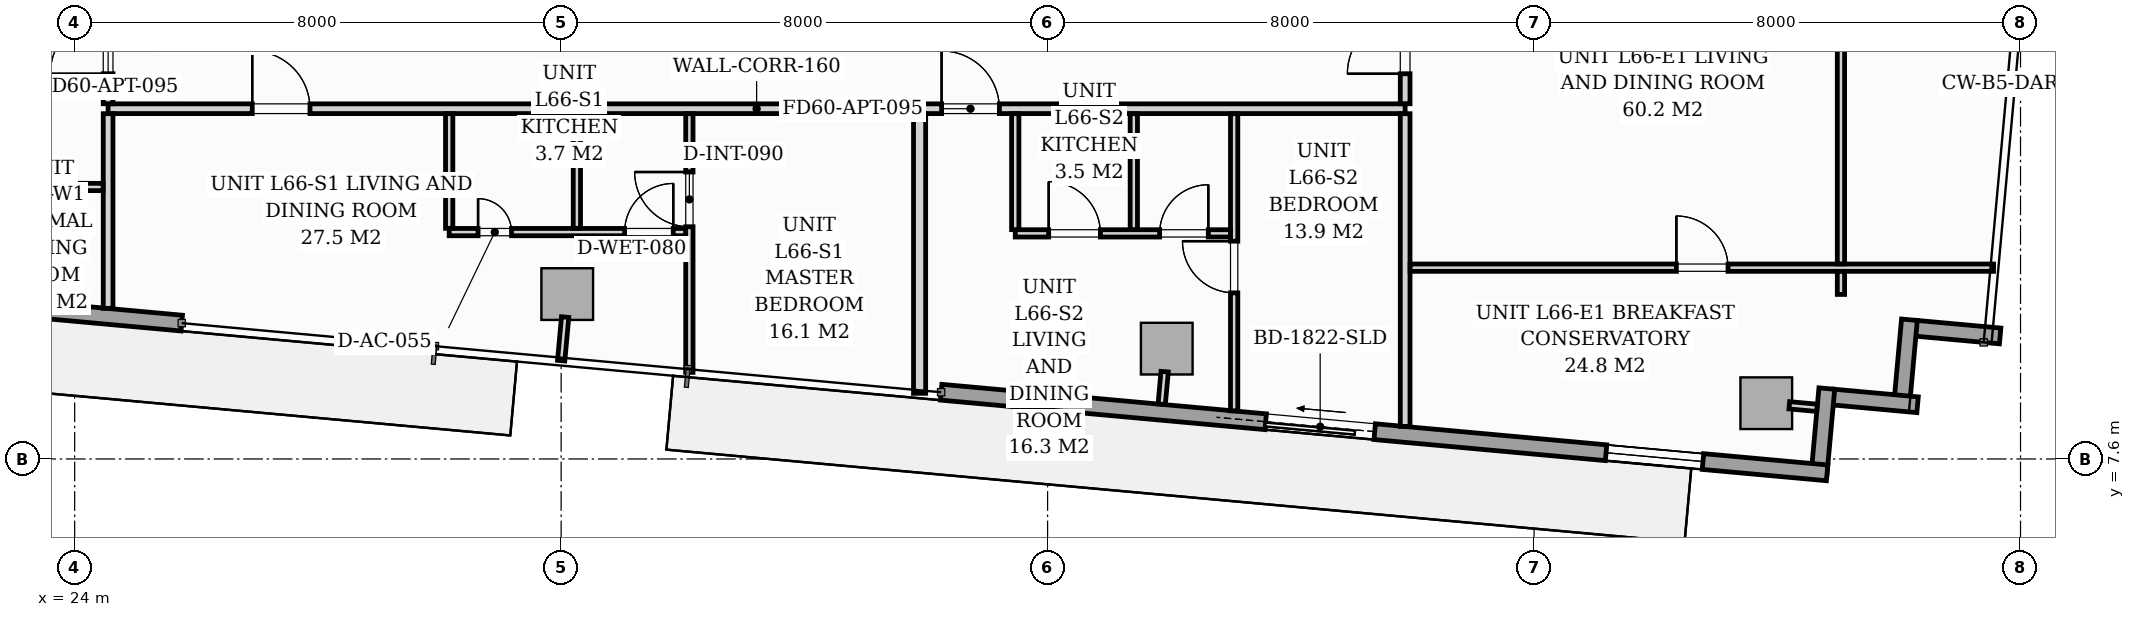
"""IFC4 building model, lengths in metres.
Left out: names, types, materials, properties, quantities, classifications, styles, units other than length and angle.
Written with IfcOpenShell. Run it as: python <this file> out.ifc"""

import sys

from ifc_helpers import new_model, si_unit, direction, frame, frame_2d, origin, origin_2d, place, context, subcontext, project, spatial, rectangle, extrude, source, transform, mapped, element, fill, save


model = new_model("IFC4")
c1 = context("Model", 3, precision=1e-05, world=origin(), true_north=direction((0.0, 1.0)))
c2 = subcontext(c1, "Body", "Model", "MODEL_VIEW")
j1 = project(units=[si_unit("LENGTHUNIT", "METRE"), si_unit("PLANEANGLEUNIT", "RADIAN")], contexts=[c1])
p1 = place(None, origin())
s1 = spatial("IfcSite", under=j1, at=p1, CompositionType="ELEMENT")
p2 = place(p1, origin())
s2 = spatial("IfcBuilding", under=s1, at=p2, CompositionType="ELEMENT")
p3 = place(p2, frame((0.0, 0.0, 229.8)))
s3 = spatial("IfcBuildingStorey", under=s2, at=p3, CompositionType="ELEMENT", Elevation=229.8)
m1 = source(origin(), c2, "Body", "SweptSolid", [
    extrude(rectangle(XDim=0.85, YDim=0.85, at=origin_2d()), origin(), (0.0, 0.0, 1.0), 3.296),
])
for number, where, z_axis, x_axis in (
    (1, (32.1, 10.312, 0.002), (0.0, 0.0, 1.0), (0.996, -0.091, 0.0)),
    (2, (41.96, 9.415, 0.002), (0.0, 0.0, 1.0), (0.996, -0.091, 0.0)),
    (3, (51.819, 8.517, 0.002), (0.0, 0.0, 1.0), (0.996, -0.091, 0.0)),
):
    element("IfcColumn", number, at=place(p3, frame(where, z_axis=z_axis, x_axis=x_axis)), inside=s3, PredefinedType="COLUMN", context=c2, shape_type="MappedRepresentation", body=[
        mapped(m1, transform((0.0, 0.0, 0.0), scale=1.0)),
    ])
for number, where, z_axis, x_axis in (
    (4, (55.665, 9.623, 0.0), (0.0, 0.0, 1.0), (-0.996, 0.091, 0.0)),
    (5, (54.173, 9.889, 0.0), (0.0, 0.0, 1.0), (-0.091, -0.996, 0.0)),
):
    element("IfcWall", number, at=place(p3, frame(where, z_axis=z_axis, x_axis=x_axis)), inside=s3, PredefinedType="STANDARD", context=c2, shape_type="SweptSolid", body=[
        extrude(rectangle(XDim=1.395, YDim=0.26, at=frame_2d((0.698, 0.0))), origin(), (0.0, 0.0, 1.0), 3.04),
    ])
for number, where, z_axis, x_axis in (
    (6, (54.307, 8.492, 0.0), (0.0, 0.0, 1.0), (-0.996, 0.091, 0.0)),
    (7, (52.815, 8.758, 0.0), (0.0, 0.0, 1.0), (-0.091, -0.996, 0.0)),
):
    element("IfcWall", number, at=place(p3, frame(where, z_axis=z_axis, x_axis=x_axis)), inside=s3, PredefinedType="STANDARD", context=c2, shape_type="SweptSolid", body=[
        extrude(rectangle(XDim=1.395, YDim=0.26, at=frame_2d((0.698, 0.0))), origin(), (0.0, 0.0, 1.0), 3.04),
    ])
p4 = place(p3, frame((52.819, 7.372, 0.0), z_axis=(0.0, 0.0, 1.0), x_axis=(-0.995884447498, 0.090632043071, 0.0)))
e8 = element("IfcWall", 8, at=p4, inside=s3, PredefinedType="STANDARD", context=c2, shape_type="SweptSolid", body=[
    extrude(rectangle(XDim=14.63, YDim=0.26, at=frame_2d((7.315, 0.0))), origin(), (0.0, 0.0, 1.0), 3.04),
])
p5 = place(p4, frame((7.471, 0.0, 0.0)))
e9 = element("IfcOpeningElement", 9, at=p5, cuts=e8, PredefinedType="OPENING", context=c2, shape_type="SweptSolid", body=[
    extrude(rectangle(XDim=1.8, YDim=2.06, at=frame_2d((0.9, 1.03))), frame((0.0, 0.14, 0.0), z_axis=(0.0, -1.0, 0.0), x_axis=(1.0, 0.0, 0.0)), (0.0, 0.0, 1.0), 0.28),
])
p6 = place(p4, frame((2.05, 0.0, 0.65)))
e10 = element("IfcOpeningElement", 10, at=p6, cuts=e8, PredefinedType="OPENING", context=c2, shape_type="SweptSolid", body=[
    extrude(rectangle(XDim=1.6, YDim=1.5, at=frame_2d((0.8, 0.75))), frame((0.0, 0.14, 0.0), z_axis=(0.0, -1.0, 0.0), x_axis=(1.0, 0.0, 0.0)), (0.0, 0.0, 1.0), 0.28),
])
p7 = place(p3, frame((25.761, 9.834, 0.0), z_axis=(0.0, 0.0, 1.0), x_axis=(-0.995884584572, 0.090630536861, 0.0)))
e11 = element("IfcWall", 11, at=p7, inside=s3, PredefinedType="STANDARD", context=c2, shape_type="SweptSolid", body=[
    extrude(rectangle(XDim=14.63, YDim=0.26, at=frame_2d((7.315, 0.0))), origin(), (0.0, 0.0, 1.0), 3.04),
])
p8 = place(p7, frame((5.53, 0.0, 0.0)))
e12 = element("IfcOpeningElement", 12, at=p8, cuts=e11, PredefinedType="OPENING", context=c2, shape_type="SweptSolid", body=[
    extrude(rectangle(XDim=1.8, YDim=2.06, at=frame_2d((0.9, 1.03))), frame((0.0, 0.14, 0.0), z_axis=(0.0, -1.0, 0.0), x_axis=(1.0, 0.0, 0.0)), (0.0, 0.0, 1.0), 0.28),
])
p9 = place(p7, frame((7.9, 0.0, 0.65)))
e13 = element("IfcOpeningElement", 13, at=p9, cuts=e11, PredefinedType="OPENING", context=c2, shape_type="SweptSolid", body=[
    extrude(rectangle(XDim=1.6, YDim=1.5, at=frame_2d((0.8, 0.75))), frame((0.0, 0.14, 0.0), z_axis=(0.0, -1.0, 0.0), x_axis=(1.0, 0.0, 0.0)), (0.0, 0.0, 1.0), 0.28),
])
p10 = place(p3, frame((24.55, 13.36, 0.0), z_axis=(0.0, 0.0, 1.0), x_axis=(1.0, 0.0, 0.0)))
e14 = element("IfcWall", 14, at=p10, inside=s3, PredefinedType="PARTITIONING", context=c2, shape_type="SweptSolid", body=[
    extrude(rectangle(XDim=21.33, YDim=0.16, at=frame_2d((10.665, 0.0))), origin(), (0.0, 0.0, 1.0), 2.55),
])
p11 = place(p10, frame((2.37, 0.0, 0.0)))
e15 = element("IfcOpeningElement", 15, at=p11, cuts=e14, PredefinedType="OPENING", context=c2, shape_type="SweptSolid", body=[
    extrude(rectangle(XDim=0.95, YDim=2.06, at=frame_2d((0.475, 1.03))), frame((0.0, 0.09, 0.0), z_axis=(0.0, -1.0, 0.0), x_axis=(1.0, 0.0, 0.0)), (0.0, 0.0, 1.0), 0.18),
])
p12 = place(p10, frame((13.707, 0.0, 0.0)))
e16 = element("IfcOpeningElement", 16, at=p12, cuts=e14, PredefinedType="OPENING", context=c2, shape_type="SweptSolid", body=[
    extrude(rectangle(XDim=0.95, YDim=2.06, at=frame_2d((0.475, 1.03))), frame((0.0, 0.09, 0.0), z_axis=(0.0, -1.0, 0.0), x_axis=(1.0, 0.0, 0.0)), (0.0, 0.0, 1.0), 0.18),
])
p13 = place(p3, frame((24.55, 10.077, 0.0), z_axis=(0.0, 0.0, 1.0), x_axis=(0.0, 1.0, 0.0)))
e17 = element("IfcWall", 17, at=p13, inside=s3, PredefinedType="PARTITIONING", context=c2, shape_type="SweptSolid", body=[
    extrude(rectangle(XDim=3.201, YDim=0.16, at=frame_2d((1.601, 0.0))), origin(), (0.0, 0.0, 1.0), 3.04),
])
p14 = place(p3, frame((24.55, 13.442, 0.0), z_axis=(0.0, 0.0, 1.0), x_axis=(0.0, 1.0, 0.0)))
e18 = element("IfcWall", 18, at=p14, inside=s3, PredefinedType="PARTITIONING", context=c2, shape_type="SweptSolid", body=[
    extrude(rectangle(XDim=7.208, YDim=0.16, at=frame_2d((3.604, 0.0))), origin(), (0.0, 0.0, 1.0), 3.04),
])
p15 = place(p14, frame((0.493, 0.0, 0.0)))
e19 = element("IfcOpeningElement", 19, at=p15, cuts=e18, PredefinedType="OPENING", context=c2, shape_type="SweptSolid", body=[
    extrude(rectangle(XDim=0.95, YDim=2.06, at=frame_2d((0.475, 1.03))), frame((0.0, 0.09, 0.0), z_axis=(0.0, -1.0, 0.0), x_axis=(1.0, 0.0, 0.0)), (0.0, 0.0, 1.0), 0.18),
])
p16 = place(p14, frame((4.721, 0.0, 0.0)))
e20 = element("IfcOpeningElement", 20, at=p16, cuts=e18, PredefinedType="OPENING", context=c2, shape_type="SweptSolid", body=[
    extrude(rectangle(XDim=0.95, YDim=2.06, at=frame_2d((0.475, 1.03))), frame((0.0, 0.09, 0.0), z_axis=(0.0, -1.0, 0.0), x_axis=(1.0, 0.0, 0.0)), (0.0, 0.0, 1.0), 0.18),
])
p17 = place(p3, frame((45.88, 8.136, 0.0), z_axis=(0.0, 0.0, 1.0), x_axis=(0.0, 1.0, 0.0)))
e21 = element("IfcWall", 21, at=p17, inside=s3, PredefinedType="PARTITIONING", context=c2, shape_type="SweptSolid", body=[
    extrude(rectangle(XDim=5.142, YDim=0.16, at=frame_2d((2.571, 0.0))), origin(), (0.0, 0.0, 1.0), 3.04),
])
p18 = place(p3, frame((45.88, 13.442, 0.0), z_axis=(0.0, 0.0, 1.0), x_axis=(0.0, 1.0, 0.0)))
e22 = element("IfcWall", 22, at=p18, inside=s3, PredefinedType="PARTITIONING", context=c2, shape_type="SweptSolid", body=[
    extrude(rectangle(XDim=4.36, YDim=0.16, at=frame_2d((2.18, 0.0))), origin(), (0.0, 0.0, 1.0), 3.04),
])
p19 = place(p18, frame((0.493, 0.0, 0.0)))
e23 = element("IfcOpeningElement", 23, at=p19, cuts=e22, PredefinedType="OPENING", context=c2, shape_type="SweptSolid", body=[
    extrude(rectangle(XDim=0.95, YDim=2.06, at=frame_2d((0.475, 1.03))), frame((0.0, 0.09, 0.0), z_axis=(0.0, -1.0, 0.0), x_axis=(1.0, 0.0, 0.0)), (0.0, 0.0, 1.0), 0.18),
])
p20 = place(p3, frame((34.109, 9.024, 0.0), z_axis=(0.0, 0.0, 1.0), x_axis=(0.0, 1.0, 0.0)))
e24 = element("IfcWall", 24, at=p20, inside=s3, PredefinedType="PARTITIONING", context=c2, shape_type="SweptSolid", body=[
    extrude(rectangle(XDim=4.254, YDim=0.12, at=frame_2d((2.127, 0.0))), origin(), (0.0, 0.0, 1.0), 3.04),
])
p21 = place(p20, frame((2.395, 0.0, 0.0)))
e25 = element("IfcOpeningElement", 25, at=p21, cuts=e24, PredefinedType="OPENING", context=c2, shape_type="SweptSolid", body=[
    extrude(rectangle(XDim=0.9, YDim=2.05, at=frame_2d((0.45, 1.025))), frame((0.0, 0.07, 0.0), z_axis=(0.0, -1.0, 0.0), x_axis=(1.0, 0.0, 0.0)), (0.0, 0.0, 1.0), 0.14),
])
p22 = place(p3, frame((30.159, 11.331, 0.0), z_axis=(0.0, 0.0, 1.0), x_axis=(1.0, 0.0, 0.0)))
e26 = element("IfcWall", 26, at=p22, inside=s3, PredefinedType="PARTITIONING", context=c2, shape_type="SweptSolid", body=[
    extrude(rectangle(XDim=3.888, YDim=0.12, at=frame_2d((1.944, 0.0))), origin(), (0.0, 0.0, 1.0), 2.55),
])
p23 = place(p22, frame((0.475, 0.0, 0.0)))
e27 = element("IfcOpeningElement", 27, at=p23, cuts=e26, PredefinedType="OPENING", context=c2, shape_type="SweptSolid", body=[
    extrude(rectangle(XDim=0.55, YDim=2.0, at=frame_2d((0.275, 1.0))), frame((0.0, 0.07, 0.0), z_axis=(0.0, -1.0, 0.0), x_axis=(1.0, 0.0, 0.0)), (0.0, 0.0, 1.0), 0.14),
])
p24 = place(p22, frame((2.885, 0.0, 0.0)))
e28 = element("IfcOpeningElement", 28, at=p24, cuts=e26, PredefinedType="OPENING", context=c2, shape_type="SweptSolid", body=[
    extrude(rectangle(XDim=0.8, YDim=2.02, at=frame_2d((0.4, 1.01))), frame((0.0, 0.07, 0.0), z_axis=(0.0, -1.0, 0.0), x_axis=(1.0, 0.0, 0.0)), (0.0, 0.0, 1.0), 0.14),
])
p25 = place(p3, frame((32.259, 11.393, 0.0), z_axis=(0.0, 0.0, 1.0), x_axis=(0.0, 1.0, 0.0)))
e29 = element("IfcWall", 29, at=p25, inside=s3, PredefinedType="PARTITIONING", context=c2, shape_type="SweptSolid", body=[
    extrude(rectangle(XDim=1.885, YDim=0.12, at=frame_2d((0.942, 0.0))), origin(), (0.0, 0.0, 1.0), 2.4),
])
p26 = place(p3, frame((30.159, 11.393, 0.0), z_axis=(0.0, 0.0, 1.0), x_axis=(0.0, 1.0, 0.0)))
e30 = element("IfcWall", 30, at=p26, inside=s3, PredefinedType="PARTITIONING", context=c2, shape_type="SweptSolid", body=[
    extrude(rectangle(XDim=1.885, YDim=0.12, at=frame_2d((0.942, 0.0))), origin(), (0.0, 0.0, 1.0), 3.04),
])
p27 = place(p3, frame((37.895, 8.68, 0.0), z_axis=(0.0, 0.0, 1.0), x_axis=(0.0, 1.0, 0.0)))
e31 = element("IfcWall", 31, at=p27, inside=s3, PredefinedType="PARTITIONING", context=c2, shape_type="SweptSolid", body=[
    extrude(rectangle(XDim=4.598, YDim=0.2, at=frame_2d((2.299, 0.0))), origin(), (0.0, 0.0, 1.0), 3.04),
])
p28 = place(p3, frame((43.068, 8.392, 0.0), z_axis=(0.0, 0.0, 1.0), x_axis=(0.0, 1.0, 0.0)))
e32 = element("IfcWall", 32, at=p28, inside=s3, PredefinedType="PARTITIONING", context=c2, shape_type="SweptSolid", body=[
    extrude(rectangle(XDim=4.886, YDim=0.12, at=frame_2d((2.443, 0.0))), origin(), (0.0, 0.0, 1.0), 3.04),
])
p29 = place(p28, frame((1.94, 0.0, 0.0)))
e33 = element("IfcOpeningElement", 33, at=p29, cuts=e32, PredefinedType="OPENING", context=c2, shape_type="SweptSolid", body=[
    extrude(rectangle(XDim=0.85, YDim=2.05, at=frame_2d((0.425, 1.025))), frame((0.0, 0.07, 0.0), z_axis=(0.0, -1.0, 0.0), x_axis=(1.0, 0.0, 0.0)), (0.0, 0.0, 1.0), 0.14),
])
p30 = place(p3, frame((39.468, 11.31, 0.0), z_axis=(0.0, 0.0, 1.0), x_axis=(1.0, 0.0, 0.0)))
e34 = element("IfcWall", 34, at=p30, inside=s3, PredefinedType="PARTITIONING", context=c2, shape_type="SweptSolid", body=[
    extrude(rectangle(XDim=3.538, YDim=0.12, at=frame_2d((1.769, 0.0))), origin(), (0.0, 0.0, 1.0), 3.04),
])
p31 = place(p30, frame((0.55, 0.0, 0.0)))
e35 = element("IfcOpeningElement", 35, at=p31, cuts=e34, PredefinedType="OPENING", context=c2, shape_type="SweptSolid", body=[
    extrude(rectangle(XDim=0.85, YDim=2.05, at=frame_2d((0.425, 1.025))), frame((0.0, 0.07, 0.0), z_axis=(0.0, -1.0, 0.0), x_axis=(1.0, 0.0, 0.0)), (0.0, 0.0, 1.0), 0.14),
])
p32 = place(p30, frame((2.375, 0.0, 0.0)))
e36 = element("IfcOpeningElement", 36, at=p32, cuts=e34, PredefinedType="OPENING", context=c2, shape_type="SweptSolid", body=[
    extrude(rectangle(XDim=0.8, YDim=2.02, at=frame_2d((0.4, 1.01))), frame((0.0, 0.07, 0.0), z_axis=(0.0, -1.0, 0.0), x_axis=(1.0, 0.0, 0.0)), (0.0, 0.0, 1.0), 0.14),
])
for number, where, z_axis, x_axis in (
    (37, (39.468, 11.372, 0.0), (0.0, 0.0, 1.0), (0.0, 1.0, 0.0)),
    (38, (41.418, 11.372, 0.0), (0.0, 0.0, 1.0), (0.0, 1.0, 0.0)),
):
    element("IfcWall", number, at=place(p3, frame(where, z_axis=z_axis, x_axis=x_axis)), inside=s3, PredefinedType="PARTITIONING", context=c2, shape_type="SweptSolid", body=[
        extrude(rectangle(XDim=1.906, YDim=0.12, at=frame_2d((0.953, 0.0))), origin(), (0.0, 0.0, 1.0), 3.04),
    ])
p33 = place(p3, frame((13.643, 12.073, 0.0), z_axis=(0.0, 0.0, 1.0), x_axis=(1.0, 0.0, 0.0)))
e39 = element("IfcWall", 39, at=p33, inside=s3, PredefinedType="PARTITIONING", context=c2, shape_type="SweptSolid", body=[
    extrude(rectangle(XDim=10.825, YDim=0.12, at=frame_2d((5.413, 0.0))), origin(), (0.0, 0.0, 1.0), 2.482),
])
p34 = place(p33, frame((4.988, 0.0, 0.0)))
e40 = element("IfcOpeningElement", 40, at=p34, cuts=e39, PredefinedType="OPENING", context=c2, shape_type="SweptSolid", body=[
    extrude(rectangle(XDim=0.85, YDim=2.05, at=frame_2d((0.425, 1.025))), frame((0.0, 0.07, 0.0), z_axis=(0.0, -1.0, 0.0), x_axis=(1.0, 0.0, 0.0)), (0.0, 0.0, 1.0), 0.14),
])
p35 = place(p3, frame((45.962, 10.746, 0.0), z_axis=(0.0, 0.0, 1.0), x_axis=(1.0, 0.0, 0.0)))
e41 = element("IfcWall", 41, at=p35, inside=s3, PredefinedType="PARTITIONING", context=c2, shape_type="SweptSolid", body=[
    extrude(rectangle(XDim=9.594, YDim=0.12, at=frame_2d((4.797, 0.0))), origin(), (0.0, 0.0, 1.0), 3.04),
])
p36 = place(p35, frame((4.378, 0.0, 0.0)))
e42 = element("IfcOpeningElement", 42, at=p36, cuts=e41, PredefinedType="OPENING", context=c2, shape_type="SweptSolid", body=[
    extrude(rectangle(XDim=0.85, YDim=2.05, at=frame_2d((0.425, 1.025))), frame((0.0, 0.07, 0.0), z_axis=(0.0, -1.0, 0.0), x_axis=(1.0, 0.0, 0.0)), (0.0, 0.0, 1.0), 0.14),
])
p37 = place(p3, frame((53.047, 10.306, 0.0), z_axis=(0.0, 0.0, 1.0), x_axis=(0.0, 1.0, 0.0)))
e43 = element("IfcWall", 43, at=p37, inside=s3, PredefinedType="PARTITIONING", context=c2, shape_type="SweptSolid", body=[
    extrude(rectangle(XDim=0.378, YDim=0.12, at=frame_2d((0.189, 0.0))), origin(), (0.0, 0.0, 1.0), 3.04),
])
p38 = place(p3, frame((53.047, 10.808, 0.0), z_axis=(0.0, 0.0, 1.0), x_axis=(0.0, 1.0, 0.0)))
e44 = element("IfcWall", 44, at=p38, inside=s3, PredefinedType="PARTITIONING", context=c2, shape_type="SweptSolid", body=[
    extrude(rectangle(XDim=10.084, YDim=0.12, at=frame_2d((5.042, 0.0))), origin(), (0.0, 0.0, 1.0), 3.04),
])
p39 = place(p38, frame((3.54, 0.0, 0.0)))
e45 = element("IfcOpeningElement", 45, at=p39, cuts=e44, PredefinedType="OPENING", context=c2, shape_type="SweptSolid", body=[
    extrude(rectangle(XDim=0.85, YDim=2.05, at=frame_2d((0.425, 1.025))), frame((0.0, 0.07, 0.0), z_axis=(0.0, -1.0, 0.0), x_axis=(1.0, 0.0, 0.0)), (0.0, 0.0, 1.0), 0.14),
])
p40 = place(p3, frame((32.066, 9.933, 0.0), z_axis=(0.0, 0.0, 1.0), x_axis=(-0.090872036342, -0.995862577373, 0.0)))
e46 = element("IfcWall", 46, at=p40, inside=s3, PredefinedType="PARTITIONING", context=c2, shape_type="SweptSolid", body=[
    extrude(rectangle(XDim=0.72, YDim=0.12, at=frame_2d((0.36, 0.0))), origin(), (0.0, 0.0, 1.0), 3.04),
])
p41 = place(p3, frame((41.925, 9.036, 0.0), z_axis=(0.0, 0.0, 1.0), x_axis=(-0.090740281653, -0.995874591144, 0.0)))
e47 = element("IfcWall", 47, at=p41, inside=s3, PredefinedType="PARTITIONING", context=c2, shape_type="SweptSolid", body=[
    extrude(rectangle(XDim=0.538, YDim=0.12, at=frame_2d((0.269, 0.0))), origin(), (0.0, 0.0, 1.0), 3.04),
])
p42 = place(p3, frame((52.197, 8.483, 0.0), z_axis=(0.0, 0.0, 1.0), x_axis=(0.995884462012, -0.090631883588, 0.0)))
e48 = element("IfcWall", 48, at=p42, inside=s3, PredefinedType="PARTITIONING", context=c2, shape_type="SweptSolid", body=[
    extrude(rectangle(XDim=0.458, YDim=0.12, at=frame_2d((0.229, 0.0))), origin(), (0.0, 0.0, 1.0), 3.04),
])
m2 = source(origin(), c2, "Body", "SweptSolid", [
    extrude(rectangle(XDim=1.8, YDim=2.06, at=frame_2d((0.9, 1.03))), frame((0.0, 0.025, 0.0), z_axis=(0.0, -1.0, 0.0), x_axis=(1.0, 0.0, 0.0)), (0.0, 0.0, 1.0), 0.05),
])
p43 = place(p5, origin())
e49 = element("IfcDoor", 49, at=p43, inside=s3, OperationType="SLIDING_TO_RIGHT", PredefinedType="DOOR", context=c2, shape_type="MappedRepresentation", body=[
    mapped(m2, transform((0.0, 0.0, 0.0), scale=1.0)),
])
fill(e9, e49)
m3 = source(origin(), c2, "Body", "SweptSolid", [
    extrude(rectangle(XDim=1.6, YDim=1.5, at=frame_2d((0.8, 0.75))), frame((0.0, 0.03, 0.0), z_axis=(0.0, -1.0, 0.0), x_axis=(1.0, 0.0, 0.0)), (0.0, 0.0, 1.0), 0.06),
])
p44 = place(p6, origin())
e50 = element("IfcWindow", 50, at=p44, inside=s3, PartitioningType="SINGLE_PANEL", PredefinedType="WINDOW", context=c2, shape_type="MappedRepresentation", body=[
    mapped(m3, transform((0.0, 0.0, 0.0), scale=1.0)),
])
fill(e10, e50)
m4 = source(origin(), c2, "Body", "SweptSolid", [
    extrude(rectangle(XDim=0.95, YDim=2.06, at=frame_2d((0.475, 1.03))), frame((0.0, 0.025, 0.0), z_axis=(0.0, -1.0, 0.0), x_axis=(1.0, 0.0, 0.0)), (0.0, 0.0, 1.0), 0.05),
])
p45 = place(p11, origin())
e51 = element("IfcDoor", 51, at=p45, inside=s3, OperationType="SINGLE_SWING_LEFT", PredefinedType="DOOR", context=c2, shape_type="MappedRepresentation", body=[
    mapped(m4, transform((0.0, 0.0, 0.0), scale=1.0)),
])
fill(e15, e51)
m5 = source(origin(), c2, "Body", "SweptSolid", [
    extrude(rectangle(XDim=0.9, YDim=2.05, at=frame_2d((0.45, 1.025))), frame((0.0, 0.025, 0.0), z_axis=(0.0, -1.0, 0.0), x_axis=(1.0, 0.0, 0.0)), (0.0, 0.0, 1.0), 0.05),
])
p46 = place(p21, origin())
e52 = element("IfcDoor", 52, at=p46, inside=s3, OperationType="SINGLE_SWING_RIGHT", PredefinedType="DOOR", context=c2, shape_type="MappedRepresentation", body=[
    mapped(m5, transform((0.0, 0.0, 0.0), scale=1.0)),
])
fill(e25, e52)
m6 = source(origin(), c2, "Body", "SweptSolid", [
    extrude(rectangle(XDim=0.55, YDim=2.0, at=frame_2d((0.275, 1.0))), frame((0.0, 0.025, 0.0), z_axis=(0.0, -1.0, 0.0), x_axis=(1.0, 0.0, 0.0)), (0.0, 0.0, 1.0), 0.05),
])
p47 = place(p23, origin())
e53 = element("IfcDoor", 53, at=p47, inside=s3, OperationType="SINGLE_SWING_LEFT", PredefinedType="DOOR", context=c2, shape_type="MappedRepresentation", body=[
    mapped(m6, transform((0.0, 0.0, 0.0), scale=1.0)),
])
fill(e27, e53)
m7 = source(origin(), c2, "Body", "SweptSolid", [
    extrude(rectangle(XDim=0.8, YDim=2.02, at=frame_2d((0.4, 1.01))), frame((0.0, 0.025, 0.0), z_axis=(0.0, -1.0, 0.0), x_axis=(1.0, 0.0, 0.0)), (0.0, 0.0, 1.0), 0.05),
])
p48 = place(p24, origin())
e54 = element("IfcDoor", 54, at=p48, inside=s3, OperationType="SINGLE_SWING_RIGHT", PredefinedType="DOOR", context=c2, shape_type="MappedRepresentation", body=[
    mapped(m7, transform((0.0, 0.0, 0.0), scale=1.0)),
])
fill(e28, e54)
p49 = place(p12, origin())
e55 = element("IfcDoor", 55, at=p49, inside=s3, OperationType="SINGLE_SWING_LEFT", PredefinedType="DOOR", context=c2, shape_type="MappedRepresentation", body=[
    mapped(m4, transform((0.0, 0.0, 0.0), scale=1.0)),
])
fill(e16, e55)
m8 = source(origin(), c2, "Body", "SweptSolid", [
    extrude(rectangle(XDim=0.85, YDim=2.05, at=frame_2d((0.425, 1.025))), frame((0.0, 0.025, 0.0), z_axis=(0.0, -1.0, 0.0), x_axis=(1.0, 0.0, 0.0)), (0.0, 0.0, 1.0), 0.05),
])
p50 = place(p29, origin())
e56 = element("IfcDoor", 56, at=p50, inside=s3, OperationType="SINGLE_SWING_RIGHT", PredefinedType="DOOR", context=c2, shape_type="MappedRepresentation", body=[
    mapped(m8, transform((0.0, 0.0, 0.0), scale=1.0)),
])
fill(e33, e56)
p51 = place(p31, origin())
e57 = element("IfcDoor", 57, at=p51, inside=s3, OperationType="SINGLE_SWING_LEFT", PredefinedType="DOOR", context=c2, shape_type="MappedRepresentation", body=[
    mapped(m8, transform((0.0, 0.0, 0.0), scale=1.0)),
])
fill(e35, e57)
p52 = place(p32, origin())
e58 = element("IfcDoor", 58, at=p52, inside=s3, OperationType="SINGLE_SWING_RIGHT", PredefinedType="DOOR", context=c2, shape_type="MappedRepresentation", body=[
    mapped(m7, transform((0.0, 0.0, 0.0), scale=1.0)),
])
fill(e36, e58)
p53 = place(p15, origin())
e59 = element("IfcDoor", 59, at=p53, inside=s3, OperationType="SINGLE_SWING_LEFT", PredefinedType="DOOR", context=c2, shape_type="MappedRepresentation", body=[
    mapped(m4, transform((0.0, 0.0, 0.0), scale=1.0)),
])
fill(e19, e59)
p54 = place(p19, origin())
e60 = element("IfcDoor", 60, at=p54, inside=s3, OperationType="SINGLE_SWING_LEFT", PredefinedType="DOOR", context=c2, shape_type="MappedRepresentation", body=[
    mapped(m4, transform((0.0, 0.0, 0.0), scale=1.0)),
])
fill(e23, e60)
p55 = place(p36, origin())
e61 = element("IfcDoor", 61, at=p55, inside=s3, OperationType="SINGLE_SWING_LEFT", PredefinedType="DOOR", context=c2, shape_type="MappedRepresentation", body=[
    mapped(m8, transform((0.0, 0.0, 0.0), scale=1.0)),
])
fill(e42, e61)
save(model, sys.argv[1])
